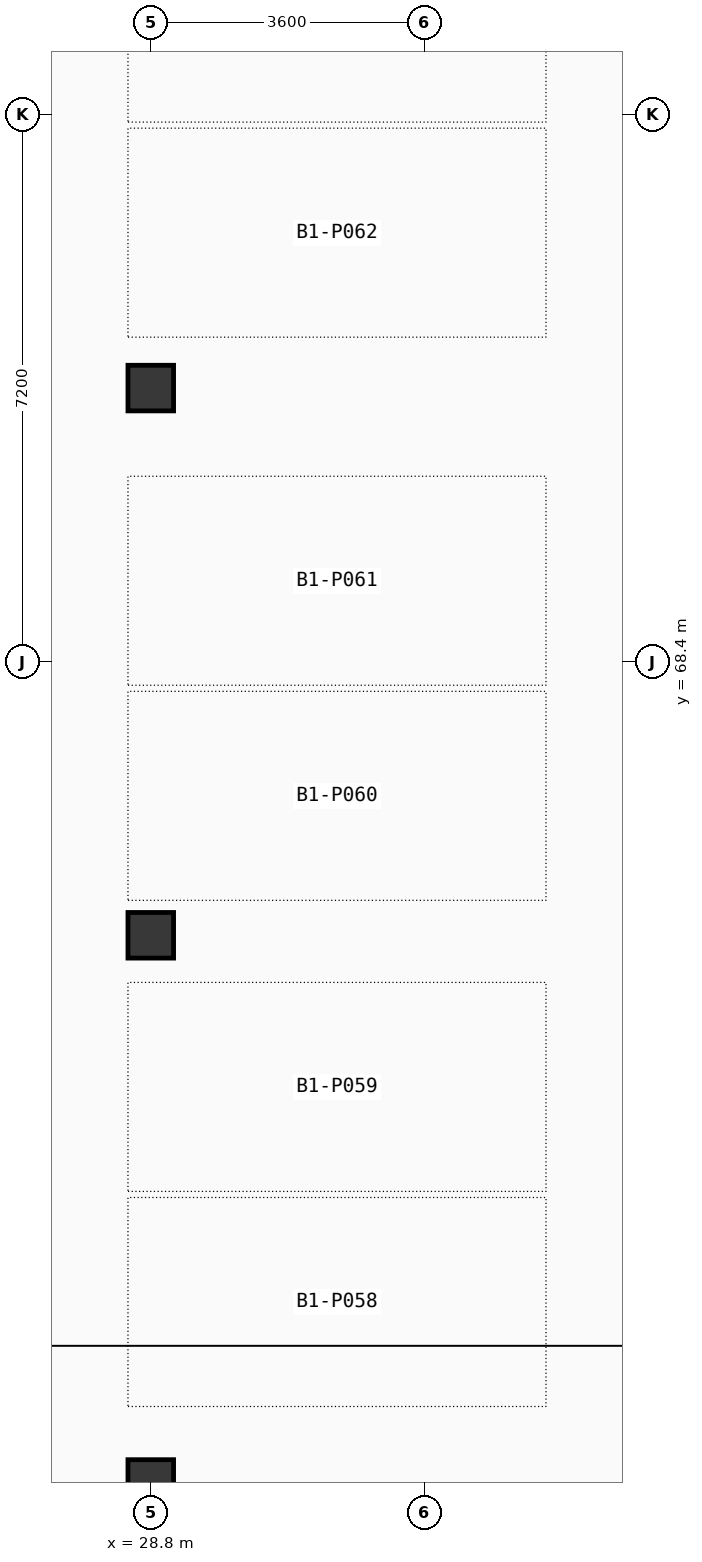
"""IFC4 building model, lengths in metres.
Left out: names, types, materials, properties, quantities, classifications, styles, units other than length and angle.
Written with IfcOpenShell. Run it as: python <this file> out.ifc"""

import sys

from ifc_helpers import new_model, si_unit, direction, frame, origin, origin_2d, place, context, subcontext, project, spatial, rectangle, extrude, element, save


model = new_model("IFC4")
c1 = context("Model", 3, precision=1e-05, world=origin(), true_north=direction((0.0, 1.0)))
c2 = subcontext(c1, "Body", "Model", "MODEL_VIEW")
j1 = project(units=[si_unit("LENGTHUNIT", "METRE"), si_unit("PLANEANGLEUNIT", "RADIAN")], contexts=[c1])
p1 = place(None, origin())
s1 = spatial("IfcSite", under=j1, at=p1, CompositionType="ELEMENT")
p2 = place(p1, origin())
s2 = spatial("IfcBuilding", under=s1, at=p2, CompositionType="ELEMENT")
p3 = place(p2, frame((0.0, 0.0, -4.2)))
s3 = spatial("IfcBuildingStorey", under=s2, at=p3, CompositionType="ELEMENT", Elevation=-4.2)
for number, where, z_axis, x_axis in (
    (1, (28.8, 57.6, 0.0), (0.0, 0.0, 1.0), (1.0, 0.0, 0.0)),
    (2, (28.8, 64.8, 0.0), (0.0, 0.0, 1.0), (1.0, 0.0, 0.0)),
    (3, (28.8, 72.0, 0.0), (0.0, 0.0, 1.0), (1.0, 0.0, 0.0)),
):
    element("IfcColumn", number, at=place(p3, frame(where, z_axis=z_axis, x_axis=x_axis)), inside=s3, PredefinedType="COLUMN", context=c2, shape_type="SweptSolid", body=[
        extrude(rectangle(XDim=0.6, YDim=0.6, at=origin_2d()), origin(), (0.0, 0.0, 1.0), 4.2),
    ])
save(model, sys.argv[1])
